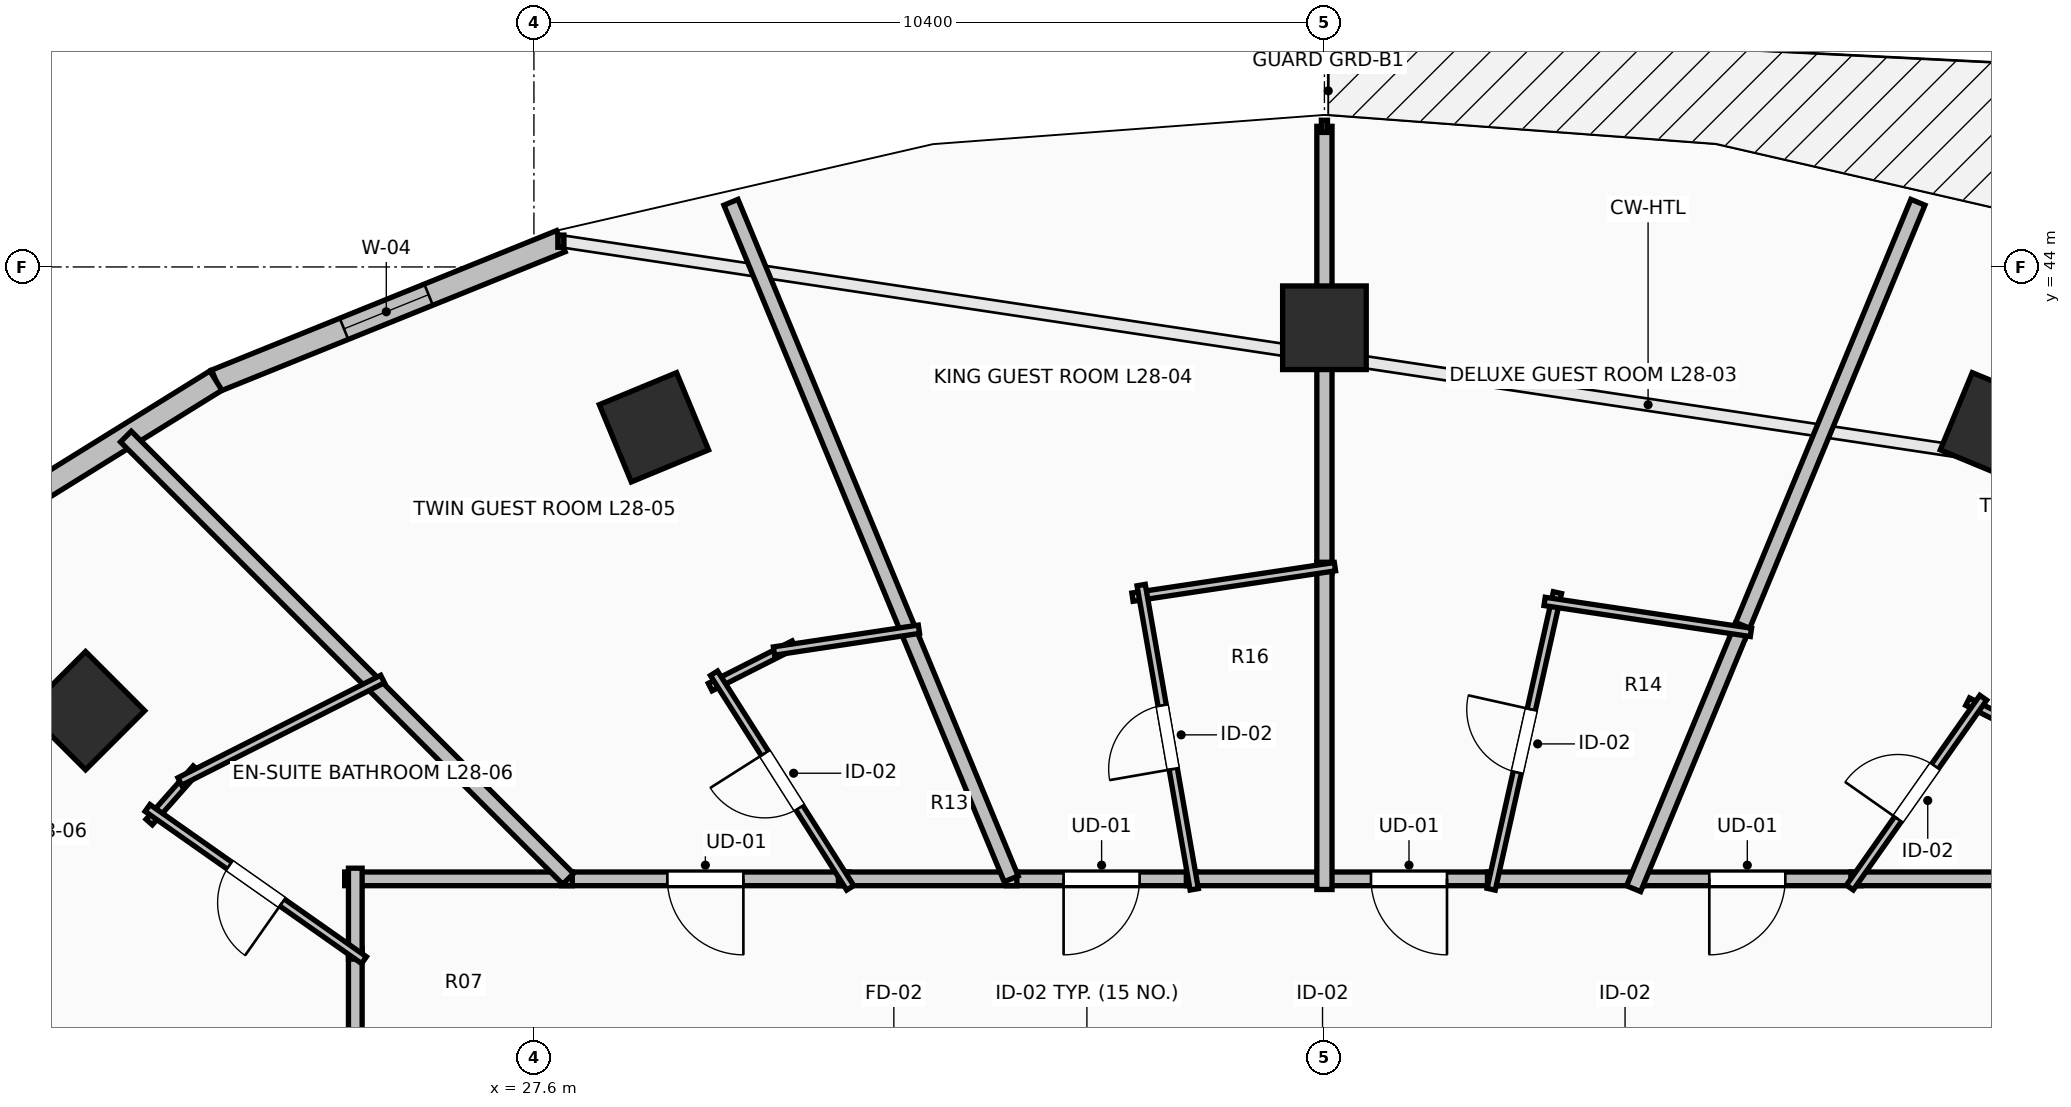
"""IFC4 building model, lengths in metres.
Left out: names, types, materials, properties, quantities, classifications, styles, units other than length and angle.
Written with IfcOpenShell. Run it as: python <this file> out.ifc"""

import sys

from ifc_helpers import new_model, si_unit, direction, frame, frame_2d, origin, origin_2d, place, context, subcontext, project, spatial, rectangle, extrude, element, fill, save


model = new_model("IFC4")
c1 = context("Model", 3, precision=1e-05, world=origin(), true_north=direction((0.0, 1.0)))
c2 = subcontext(c1, "Body", "Model", "MODEL_VIEW")
j1 = project(units=[si_unit("LENGTHUNIT", "METRE"), si_unit("PLANEANGLEUNIT", "RADIAN")], contexts=[c1])
p1 = place(None, origin())
s1 = spatial("IfcSite", under=j1, at=p1, CompositionType="ELEMENT")
p2 = place(p1, origin())
s2 = spatial("IfcBuilding", under=s1, at=p2, CompositionType="ELEMENT")
p3 = place(p2, frame((0.0, 0.0, 106.8)))
s3 = spatial("IfcBuildingStorey", under=s2, at=p3, CompositionType="ELEMENT", Elevation=106.8)
for number, where, z_axis, x_axis in (
    (1, (46.821, 41.891, 0.0), (0.0, 0.0, 1.0), (0.383, 0.924, 0.0)),
    (2, (38.0, 43.2, 0.0), (0.0, 0.0, 1.0), (0.0, 1.0, 0.0)),
    (3, (29.179, 41.891, 0.0), (0.0, 0.0, 1.0), (-0.383, 0.924, 0.0)),
    (4, (21.701, 38.162, 0.0), (0.0, 0.0, 1.0), (-0.707, 0.707, 0.0)),
):
    element("IfcColumn", number, at=place(p3, frame(where, z_axis=z_axis, x_axis=x_axis)), inside=s3, PredefinedType="COLUMN", context=c2, shape_type="SweptSolid", body=[
        extrude(rectangle(XDim=1.1, YDim=1.1, at=origin_2d()), origin(), (0.0, 0.0, 1.0), 3.5),
    ])
p4 = place(p3, frame((27.955, 44.339, 0.0), z_axis=(0.0, 0.0, 1.0), x_axis=(-0.927122233109, -0.374759075775, 0.0)))
e5 = element("IfcWall", 5, at=p4, inside=s3, PredefinedType="STANDARD", context=c2, shape_type="SweptSolid", body=[
    extrude(rectangle(XDim=4.895, YDim=0.3, at=frame_2d((2.448, 0.0))), origin(), (0.0, 0.0, 1.0), 3.24),
])
p5 = place(p4, frame((1.877, 0.0, 0.85)))
e6 = element("IfcOpeningElement", 6, at=p5, cuts=e5, PredefinedType="OPENING", context=c2, shape_type="SweptSolid", body=[
    extrude(rectangle(XDim=1.2, YDim=1.95, at=frame_2d((0.6, 0.975))), frame((0.0, 0.165, 0.0), z_axis=(0.0, -1.0, 0.0), x_axis=(1.0, 0.0, 0.0)), (0.0, 0.0, 1.0), 0.33),
])
p6 = place(p3, frame((23.416, 42.505, 0.0), z_axis=(0.0, 0.0, 1.0), x_axis=(-0.849684479743, -0.527291461038, 0.0)))
e7 = element("IfcWall", 7, at=p6, inside=s3, PredefinedType="STANDARD", context=c2, shape_type="SweptSolid", body=[
    extrude(rectangle(XDim=4.681, YDim=0.3, at=frame_2d((2.341, 0.0))), origin(), (0.0, 0.0, 1.0), 3.24),
])
p7 = place(p3, frame((45.066, 35.95, 0.0), z_axis=(0.0, 0.0, 1.0), x_axis=(-1.0, 0.0, 0.0)))
e8 = element("IfcWall", 8, at=p7, inside=s3, PredefinedType="PARTITIONING", context=c2, shape_type="SweptSolid", body=[
    extrude(rectangle(XDim=3.005, YDim=0.18, at=frame_2d((1.502, 0.0))), origin(), (0.0, 0.0, 1.0), 3.24),
])
p8 = place(p7, frame((1.002, 0.0, 0.0)))
e9 = element("IfcOpeningElement", 9, at=p8, cuts=e8, PredefinedType="OPENING", context=c2, shape_type="SweptSolid", body=[
    extrude(rectangle(XDim=1.0, YDim=2.15, at=frame_2d((0.5, 1.075))), frame((0.0, 0.105, 0.0), z_axis=(0.0, -1.0, 0.0), x_axis=(1.0, 0.0, 0.0)), (0.0, 0.0, 1.0), 0.21),
])
p9 = place(p3, frame((48.03, 35.95, 0.0), z_axis=(0.0, 0.0, 1.0), x_axis=(-1.0, 0.0, 0.0)))
e10 = element("IfcWall", 10, at=p9, inside=s3, PredefinedType="PARTITIONING", context=c2, shape_type="SweptSolid", body=[
    extrude(rectangle(XDim=3.104, YDim=0.18, at=frame_2d((1.552, 0.0))), origin(), (0.0, 0.0, 1.0), 2.432),
])
p10 = place(p3, frame((40.285, 35.95, 0.0), z_axis=(0.0, 0.0, 1.0), x_axis=(-1.0, 0.0, 0.0)))
e11 = element("IfcWall", 11, at=p10, inside=s3, PredefinedType="PARTITIONING", context=c2, shape_type="SweptSolid", body=[
    extrude(rectangle(XDim=2.345, YDim=0.18, at=frame_2d((1.172, 0.0))), origin(), (0.0, 0.0, 1.0), 3.24),
])
p11 = place(p10, frame((0.673, 0.0, 0.0)))
e12 = element("IfcOpeningElement", 12, at=p11, cuts=e11, PredefinedType="OPENING", context=c2, shape_type="SweptSolid", body=[
    extrude(rectangle(XDim=1.0, YDim=2.15, at=frame_2d((0.5, 1.075))), frame((0.0, 0.105, 0.0), z_axis=(0.0, -1.0, 0.0), x_axis=(1.0, 0.0, 0.0)), (0.0, 0.0, 1.0), 0.21),
])
p12 = place(p3, frame((42.201, 35.95, 0.0), z_axis=(0.0, 0.0, 1.0), x_axis=(-1.0, 0.0, 0.0)))
e13 = element("IfcWall", 13, at=p12, inside=s3, PredefinedType="PARTITIONING", context=c2, shape_type="SweptSolid", body=[
    extrude(rectangle(XDim=2.056, YDim=0.18, at=frame_2d((1.028, 0.0))), origin(), (0.0, 0.0, 1.0), 3.24),
])
p13 = place(p3, frame((36.323, 35.95, 0.0), z_axis=(0.0, 0.0, 1.0), x_axis=(-1.0, 0.0, 0.0)))
e14 = element("IfcWall", 14, at=p13, inside=s3, PredefinedType="PARTITIONING", context=c2, shape_type="SweptSolid", body=[
    extrude(rectangle(XDim=2.509, YDim=0.18, at=frame_2d((1.254, 0.0))), origin(), (0.0, 0.0, 1.0), 3.24),
])
p14 = place(p13, frame((0.754, 0.0, 0.0)))
e15 = element("IfcOpeningElement", 15, at=p14, cuts=e14, PredefinedType="OPENING", context=c2, shape_type="SweptSolid", body=[
    extrude(rectangle(XDim=1.0, YDim=2.15, at=frame_2d((0.5, 1.075))), frame((0.0, 0.105, 0.0), z_axis=(0.0, -1.0, 0.0), x_axis=(1.0, 0.0, 0.0)), (0.0, 0.0, 1.0), 0.21),
])
p15 = place(p3, frame((38.08, 35.95, 0.0), z_axis=(0.0, 0.0, 1.0), x_axis=(-1.0, 0.0, 0.0)))
e16 = element("IfcWall", 16, at=p15, inside=s3, PredefinedType="PARTITIONING", context=c2, shape_type="SweptSolid", body=[
    extrude(rectangle(XDim=1.897, YDim=0.18, at=frame_2d((0.948, 0.0))), origin(), (0.0, 0.0, 1.0), 3.24),
])
p16 = place(p3, frame((31.746, 35.95, 0.0), z_axis=(0.0, 0.0, 1.0), x_axis=(-1.0, 0.0, 0.0)))
e17 = element("IfcWall", 17, at=p16, inside=s3, PredefinedType="PARTITIONING", context=c2, shape_type="SweptSolid", body=[
    extrude(rectangle(XDim=3.781, YDim=0.18, at=frame_2d((1.891, 0.0))), origin(), (0.0, 0.0, 1.0), 2.432),
])
p17 = place(p16, frame((1.39, 0.0, 0.0)))
e18 = element("IfcOpeningElement", 18, at=p17, cuts=e17, PredefinedType="OPENING", context=c2, shape_type="SweptSolid", body=[
    extrude(rectangle(XDim=1.0, YDim=2.15, at=frame_2d((0.5, 1.075))), frame((0.0, 0.105, 0.0), z_axis=(0.0, -1.0, 0.0), x_axis=(1.0, 0.0, 0.0)), (0.0, 0.0, 1.0), 0.21),
])
p18 = place(p3, frame((33.954, 35.95, 0.0), z_axis=(0.0, 0.0, 1.0), x_axis=(-1.0, 0.0, 0.0)))
e19 = element("IfcWall", 19, at=p18, inside=s3, PredefinedType="PARTITIONING", context=c2, shape_type="SweptSolid", body=[
    extrude(rectangle(XDim=2.348, YDim=0.18, at=frame_2d((1.174, 0.0))), origin(), (0.0, 0.0, 1.0), 3.24),
])
p19 = place(p3, frame((25.25, 35.034, 0.0), z_axis=(0.0, 0.0, 1.0), x_axis=(0.0, -1.0, 0.0)))
e20 = element("IfcWall", 20, at=p19, inside=s3, PredefinedType="PARTITIONING", context=c2, shape_type="SweptSolid", body=[
    extrude(rectangle(XDim=3.813, YDim=0.18, at=frame_2d((1.906, 0.0))), origin(), (0.0, 0.0, 1.0), 2.432),
])
p20 = place(p19, frame((1.406, 0.0, 0.0)))
e21 = element("IfcOpeningElement", 21, at=p20, cuts=e20, PredefinedType="OPENING", context=c2, shape_type="SweptSolid", body=[
    extrude(rectangle(XDim=1.0, YDim=2.15, at=frame_2d((0.5, 1.075))), frame((0.0, 0.105, 0.0), z_axis=(0.0, -1.0, 0.0), x_axis=(1.0, 0.0, 0.0)), (0.0, 0.0, 1.0), 0.21),
])
p21 = place(p3, frame((28.105, 35.95, 0.0), z_axis=(0.0, 0.0, 1.0), x_axis=(-1.0, 0.0, 0.0)))
e22 = element("IfcWall", 22, at=p21, inside=s3, PredefinedType="PARTITIONING", context=c2, shape_type="SweptSolid", body=[
    extrude(rectangle(XDim=2.995, YDim=0.18, at=frame_2d((1.498, 0.0))), origin(), (0.0, 0.0, 1.0), 2.432),
])
p22 = place(p3, frame((25.25, 36.09, 0.0), z_axis=(0.0, 0.0, 1.0), x_axis=(0.0, -1.0, 0.0)))
e23 = element("IfcWall", 23, at=p22, inside=s3, PredefinedType="PARTITIONING", context=c2, shape_type="SweptSolid", body=[
    extrude(rectangle(XDim=1.196, YDim=0.18, at=frame_2d((0.598, 0.0))), origin(), (0.0, 0.0, 1.0), 2.432),
])
p23 = place(p3, frame((46.462, 38.281, 0.0), z_axis=(0.0, 0.0, 1.0), x_axis=(0.892486842203, -0.451073426944, 0.0)))
e24 = element("IfcWall", 24, at=p23, inside=s3, PredefinedType="PARTITIONING", context=c2, shape_type="SweptSolid", body=[
    extrude(rectangle(XDim=2.982, YDim=0.11, at=frame_2d((1.491, 0.0))), origin(), (0.0, 0.0, 1.0), 2.432),
])
p24 = place(p3, frame((44.913, 35.835, 0.0), z_axis=(0.0, 0.0, 1.0), x_axis=(0.574986040322, 0.818163219312, 0.0)))
e25 = element("IfcWall", 25, at=p24, inside=s3, PredefinedType="PARTITIONING", context=c2, shape_type="SweptSolid", body=[
    extrude(rectangle(XDim=3.052, YDim=0.11, at=frame_2d((1.526, 0.0))), origin(), (0.0, 0.0, 1.0), 2.886),
])
p25 = place(p24, frame((1.101, 0.0, 0.0)))
e26 = element("IfcOpeningElement", 26, at=p25, cuts=e25, PredefinedType="OPENING", context=c2, shape_type="SweptSolid", body=[
    extrude(rectangle(XDim=0.85, YDim=2.1, at=frame_2d((0.425, 1.05))), frame((0.0, 0.07, 0.0), z_axis=(0.0, -1.0, 0.0), x_axis=(1.0, 0.0, 0.0)), (0.0, 0.0, 1.0), 0.14),
])
p26 = place(p3, frame((45.808, 44.851, 0.0), z_axis=(0.0, 0.0, 1.0), x_axis=(-0.382705075352, -0.923870567395, 0.0)))
e27 = element("IfcWall", 27, at=p26, inside=s3, PredefinedType="PARTITIONING", context=c2, shape_type="SweptSolid", body=[
    extrude(rectangle(XDim=6.164, YDim=0.2, at=frame_2d((3.082, 0.0))), origin(), (0.0, 0.0, 1.0), 2.677),
])
p27 = place(p3, frame((43.503, 39.285, 0.0), z_axis=(0.0, 0.0, 1.0), x_axis=(-0.382733183699, -0.923858923265, 0.0)))
e28 = element("IfcWall", 28, at=p27, inside=s3, PredefinedType="PARTITIONING", context=c2, shape_type="SweptSolid", body=[
    extrude(rectangle(XDim=3.75, YDim=0.2, at=frame_2d((1.875, 0.0))), origin(), (0.0, 0.0, 1.0), 2.886),
])
p28 = place(p3, frame((40.194, 35.813, 0.0), z_axis=(0.0, 0.0, 1.0), x_axis=(0.21804880916, 0.975937865248, 0.0)))
e29 = element("IfcWall", 29, at=p28, inside=s3, PredefinedType="PARTITIONING", context=c2, shape_type="SweptSolid", body=[
    extrude(rectangle(XDim=3.998, YDim=0.11, at=frame_2d((1.999, 0.0))), origin(), (0.0, 0.0, 1.0), 2.886),
])
p29 = place(p28, frame((1.574, 0.0, 0.0)))
e30 = element("IfcOpeningElement", 30, at=p29, cuts=e29, PredefinedType="OPENING", context=c2, shape_type="SweptSolid", body=[
    extrude(rectangle(XDim=0.85, YDim=2.1, at=frame_2d((0.425, 1.05))), frame((0.0, 0.07, 0.0), z_axis=(0.0, -1.0, 0.0), x_axis=(1.0, 0.0, 0.0)), (0.0, 0.0, 1.0), 0.14),
])
p30 = place(p3, frame((40.896, 39.6, 0.0), z_axis=(0.0, 0.0, 1.0), x_axis=(0.98891024541, -0.148514398367, 0.0)))
e31 = element("IfcWall", 31, at=p30, inside=s3, PredefinedType="PARTITIONING", context=c2, shape_type="SweptSolid", body=[
    extrude(rectangle(XDim=2.745, YDim=0.11, at=frame_2d((1.373, 0.0))), origin(), (0.0, 0.0, 1.0), 2.972),
])
p31 = place(p3, frame((38.0, 45.85, 0.0), z_axis=(0.0, 0.0, 1.0), x_axis=(0.0, -1.0, 0.0)))
e32 = element("IfcWall", 32, at=p31, inside=s3, PredefinedType="PARTITIONING", context=c2, shape_type="SweptSolid", body=[
    extrude(rectangle(XDim=5.875, YDim=0.2, at=frame_2d((2.938, 0.0))), origin(), (0.0, 0.0, 1.0), 3.24),
])
p32 = place(p3, frame((38.0, 40.115, 0.0), z_axis=(0.0, 0.0, 1.0), x_axis=(0.0, -1.0, 0.0)))
e33 = element("IfcWall", 33, at=p32, inside=s3, PredefinedType="PARTITIONING", context=c2, shape_type="SweptSolid", body=[
    extrude(rectangle(XDim=4.305, YDim=0.2, at=frame_2d((2.152, 0.0))), origin(), (0.0, 0.0, 1.0), 2.886),
])
p33 = place(p3, frame((35.475, 39.656, 0.0), z_axis=(0.0, 0.0, 1.0), x_axis=(0.988878442063, 0.148726012595, 0.0)))
e34 = element("IfcWall", 34, at=p33, inside=s3, PredefinedType="PARTITIONING", context=c2, shape_type="SweptSolid", body=[
    extrude(rectangle(XDim=2.694, YDim=0.11, at=frame_2d((1.347, 0.0))), origin(), (0.0, 0.0, 1.0), 2.972),
])
p34 = place(p3, frame((36.287, 35.812, 0.0), z_axis=(0.0, 0.0, 1.0), x_axis=(-0.171838135253, 0.985125197766, 0.0)))
e35 = element("IfcWall", 35, at=p34, inside=s3, PredefinedType="PARTITIONING", context=c2, shape_type="SweptSolid", body=[
    extrude(rectangle(XDim=4.063, YDim=0.11, at=frame_2d((2.032, 0.0))), origin(), (0.0, 0.0, 1.0), 2.886),
])
p35 = place(p34, frame((1.607, 0.0, 0.0)))
e36 = element("IfcOpeningElement", 36, at=p35, cuts=e35, PredefinedType="OPENING", context=c2, shape_type="SweptSolid", body=[
    extrude(rectangle(XDim=0.85, YDim=2.1, at=frame_2d((0.425, 1.05))), frame((0.0, 0.07, 0.0), z_axis=(0.0, -1.0, 0.0), x_axis=(1.0, 0.0, 0.0)), (0.0, 0.0, 1.0), 0.14),
])
p36 = place(p3, frame((30.192, 44.851, 0.0), z_axis=(0.0, 0.0, 1.0), x_axis=(0.382687492799, -0.923877850614, 0.0)))
e37 = element("IfcWall", 37, at=p36, inside=s3, PredefinedType="PARTITIONING", context=c2, shape_type="SweptSolid", body=[
    extrude(rectangle(XDim=9.635, YDim=0.2, at=frame_2d((4.817, 0.0))), origin(), (0.0, 0.0, 1.0), 2.432),
])
p37 = place(p3, frame((29.919, 38.473, 0.0), z_axis=(0.0, 0.0, 1.0), x_axis=(0.892084606746, 0.45186840386, 0.0)))
e38 = element("IfcWall", 38, at=p37, inside=s3, PredefinedType="PARTITIONING", context=c2, shape_type="SweptSolid", body=[
    extrude(rectangle(XDim=1.236, YDim=0.11, at=frame_2d((0.618, 0.0))), origin(), (0.0, 0.0, 1.0), 3.24),
])
p38 = place(p3, frame((30.759, 38.947, 0.0), z_axis=(0.0, 0.0, 1.0), x_axis=(0.988889867338, 0.148650026153, 0.0)))
e39 = element("IfcWall", 39, at=p38, inside=s3, PredefinedType="PARTITIONING", context=c2, shape_type="SweptSolid", body=[
    extrude(rectangle(XDim=1.928, YDim=0.11, at=frame_2d((0.964, 0.0))), origin(), (0.0, 0.0, 1.0), 3.24),
])
p39 = place(p3, frame((31.761, 35.832, 0.0), z_axis=(0.0, 0.0, 1.0), x_axis=(-0.535991614842, 0.844223305067, 0.0)))
e40 = element("IfcWall", 40, at=p39, inside=s3, PredefinedType="PARTITIONING", context=c2, shape_type="SweptSolid", body=[
    extrude(rectangle(XDim=3.343, YDim=0.11, at=frame_2d((1.672, 0.0))), origin(), (0.0, 0.0, 1.0), 2.432),
])
p40 = place(p39, frame((1.247, 0.0, 0.0)))
e41 = element("IfcOpeningElement", 41, at=p40, cuts=e40, PredefinedType="OPENING", context=c2, shape_type="SweptSolid", body=[
    extrude(rectangle(XDim=0.85, YDim=2.1, at=frame_2d((0.425, 1.05))), frame((0.0, 0.07, 0.0), z_axis=(0.0, -1.0, 0.0), x_axis=(1.0, 0.0, 0.0)), (0.0, 0.0, 1.0), 0.14),
])
p41 = place(p3, frame((22.232, 41.768, 0.0), z_axis=(0.0, 0.0, 1.0), x_axis=(0.707106781187, -0.707106781187, 0.0)))
e42 = element("IfcWall", 42, at=p41, inside=s3, PredefinedType="PARTITIONING", context=c2, shape_type="SweptSolid", body=[
    extrude(rectangle(XDim=8.228, YDim=0.2, at=frame_2d((4.114, 0.0))), origin(), (0.0, 0.0, 1.0), 2.432),
])
p42 = place(p3, frame((22.538, 36.697, 0.0), z_axis=(0.0, 0.0, 1.0), x_axis=(0.662242037053, 0.749289986827, 0.0)))
e43 = element("IfcWall", 43, at=p42, inside=s3, PredefinedType="PARTITIONING", context=c2, shape_type="SweptSolid", body=[
    extrude(rectangle(XDim=0.937, YDim=0.11, at=frame_2d((0.468, 0.0))), origin(), (0.0, 0.0, 1.0), 2.432),
])
p43 = place(p3, frame((22.941, 37.231, 0.0), z_axis=(0.0, 0.0, 1.0), x_axis=(0.892507731149, 0.451032094024, 0.0)))
e44 = element("IfcWall", 44, at=p43, inside=s3, PredefinedType="PARTITIONING", context=c2, shape_type="SweptSolid", body=[
    extrude(rectangle(XDim=2.989, YDim=0.11, at=frame_2d((1.495, 0.0))), origin(), (0.0, 0.0, 1.0), 2.432),
])
p44 = place(p3, frame((25.365, 34.881, 0.0), z_axis=(0.0, 0.0, 1.0), x_axis=(-0.81809360258, 0.575085087111, 0.0)))
e45 = element("IfcWall", 45, at=p44, inside=s3, PredefinedType="PARTITIONING", context=c2, shape_type="SweptSolid", body=[
    extrude(rectangle(XDim=3.481, YDim=0.11, at=frame_2d((1.741, 0.0))), origin(), (0.0, 0.0, 1.0), 2.432),
])
p45 = place(p44, frame((1.316, 0.0, 0.0)))
e46 = element("IfcOpeningElement", 46, at=p45, cuts=e45, PredefinedType="OPENING", context=c2, shape_type="SweptSolid", body=[
    extrude(rectangle(XDim=0.85, YDim=2.1, at=frame_2d((0.425, 1.05))), frame((0.0, 0.07, 0.0), z_axis=(0.0, -1.0, 0.0), x_axis=(1.0, 0.0, 0.0)), (0.0, 0.0, 1.0), 0.14),
])
p46 = place(p3, frame((15.089, 35.49, 0.0), z_axis=(0.0, 0.0, 1.0), x_axis=(0.923888472039, -0.382661849723, 0.0)))
e47 = element("IfcWall", 47, at=p46, inside=s3, PredefinedType="PARTITIONING", context=c2, shape_type="SweptSolid", body=[
    extrude(rectangle(XDim=7.51, YDim=0.2, at=frame_2d((3.755, 0.0))), origin(), (0.0, 0.0, 1.0), 2.677),
])
p47 = place(p5, origin())
e48 = element("IfcWindow", 48, at=p47, inside=s3, PartitioningType="SINGLE_PANEL", PredefinedType="WINDOW", context=c2, shape_type="SweptSolid", body=[
    extrude(rectangle(XDim=1.2, YDim=1.95, at=frame_2d((0.6, 0.975))), frame((0.0, 0.03, 0.0), z_axis=(0.0, -1.0, 0.0), x_axis=(1.0, 0.0, 0.0)), (0.0, 0.0, 1.0), 0.06),
])
fill(e6, e48)
p48 = place(p8, origin())
e49 = element("IfcDoor", 49, at=p48, inside=s3, OperationType="SINGLE_SWING_RIGHT", PredefinedType="DOOR", context=c2, shape_type="SweptSolid", body=[
    extrude(rectangle(XDim=1.0, YDim=2.15, at=frame_2d((0.5, 1.075))), frame((0.0, 0.025, 0.0), z_axis=(0.0, -1.0, 0.0), x_axis=(1.0, 0.0, 0.0)), (0.0, 0.0, 1.0), 0.05),
])
fill(e9, e49)
p49 = place(p11, origin())
e50 = element("IfcDoor", 50, at=p49, inside=s3, OperationType="SINGLE_SWING_LEFT", PredefinedType="DOOR", context=c2, shape_type="SweptSolid", body=[
    extrude(rectangle(XDim=1.0, YDim=2.15, at=frame_2d((0.5, 1.075))), frame((0.0, 0.025, 0.0), z_axis=(0.0, -1.0, 0.0), x_axis=(1.0, 0.0, 0.0)), (0.0, 0.0, 1.0), 0.05),
])
fill(e12, e50)
p50 = place(p14, origin())
e51 = element("IfcDoor", 51, at=p50, inside=s3, OperationType="SINGLE_SWING_RIGHT", PredefinedType="DOOR", context=c2, shape_type="SweptSolid", body=[
    extrude(rectangle(XDim=1.0, YDim=2.15, at=frame_2d((0.5, 1.075))), frame((0.0, 0.025, 0.0), z_axis=(0.0, -1.0, 0.0), x_axis=(1.0, 0.0, 0.0)), (0.0, 0.0, 1.0), 0.05),
])
fill(e15, e51)
p51 = place(p17, origin())
e52 = element("IfcDoor", 52, at=p51, inside=s3, OperationType="SINGLE_SWING_LEFT", PredefinedType="DOOR", context=c2, shape_type="SweptSolid", body=[
    extrude(rectangle(XDim=1.0, YDim=2.15, at=frame_2d((0.5, 1.075))), frame((0.0, 0.025, 0.0), z_axis=(0.0, -1.0, 0.0), x_axis=(1.0, 0.0, 0.0)), (0.0, 0.0, 1.0), 0.05),
])
fill(e18, e52)
p52 = place(p25, origin())
e53 = element("IfcDoor", 53, at=p52, inside=s3, OperationType="SINGLE_SWING_LEFT", PredefinedType="DOOR", context=c2, shape_type="SweptSolid", body=[
    extrude(rectangle(XDim=0.85, YDim=2.1, at=frame_2d((0.425, 1.05))), frame((0.0, 0.025, 0.0), z_axis=(0.0, -1.0, 0.0), x_axis=(1.0, 0.0, 0.0)), (0.0, 0.0, 1.0), 0.05),
])
fill(e26, e53)
p53 = place(p29, origin())
e54 = element("IfcDoor", 54, at=p53, inside=s3, OperationType="SINGLE_SWING_RIGHT", PredefinedType="DOOR", context=c2, shape_type="SweptSolid", body=[
    extrude(rectangle(XDim=0.85, YDim=2.1, at=frame_2d((0.425, 1.05))), frame((0.0, 0.025, 0.0), z_axis=(0.0, -1.0, 0.0), x_axis=(1.0, 0.0, 0.0)), (0.0, 0.0, 1.0), 0.05),
])
fill(e30, e54)
p54 = place(p35, origin())
e55 = element("IfcDoor", 55, at=p54, inside=s3, OperationType="SINGLE_SWING_LEFT", PredefinedType="DOOR", context=c2, shape_type="SweptSolid", body=[
    extrude(rectangle(XDim=0.85, YDim=2.1, at=frame_2d((0.425, 1.05))), frame((0.0, 0.025, 0.0), z_axis=(0.0, -1.0, 0.0), x_axis=(1.0, 0.0, 0.0)), (0.0, 0.0, 1.0), 0.05),
])
fill(e36, e55)
p55 = place(p40, origin())
e56 = element("IfcDoor", 56, at=p55, inside=s3, OperationType="SINGLE_SWING_RIGHT", PredefinedType="DOOR", context=c2, shape_type="SweptSolid", body=[
    extrude(rectangle(XDim=0.85, YDim=2.1, at=frame_2d((0.425, 1.05))), frame((0.0, 0.025, 0.0), z_axis=(0.0, -1.0, 0.0), x_axis=(1.0, 0.0, 0.0)), (0.0, 0.0, 1.0), 0.05),
])
fill(e41, e56)
p56 = place(p45, origin())
e57 = element("IfcDoor", 57, at=p56, inside=s3, OperationType="SINGLE_SWING_LEFT", PredefinedType="DOOR", context=c2, shape_type="SweptSolid", body=[
    extrude(rectangle(XDim=0.85, YDim=2.1, at=frame_2d((0.425, 1.05))), frame((0.0, 0.025, 0.0), z_axis=(0.0, -1.0, 0.0), x_axis=(1.0, 0.0, 0.0)), (0.0, 0.0, 1.0), 0.05),
])
fill(e46, e57)
save(model, sys.argv[1])
